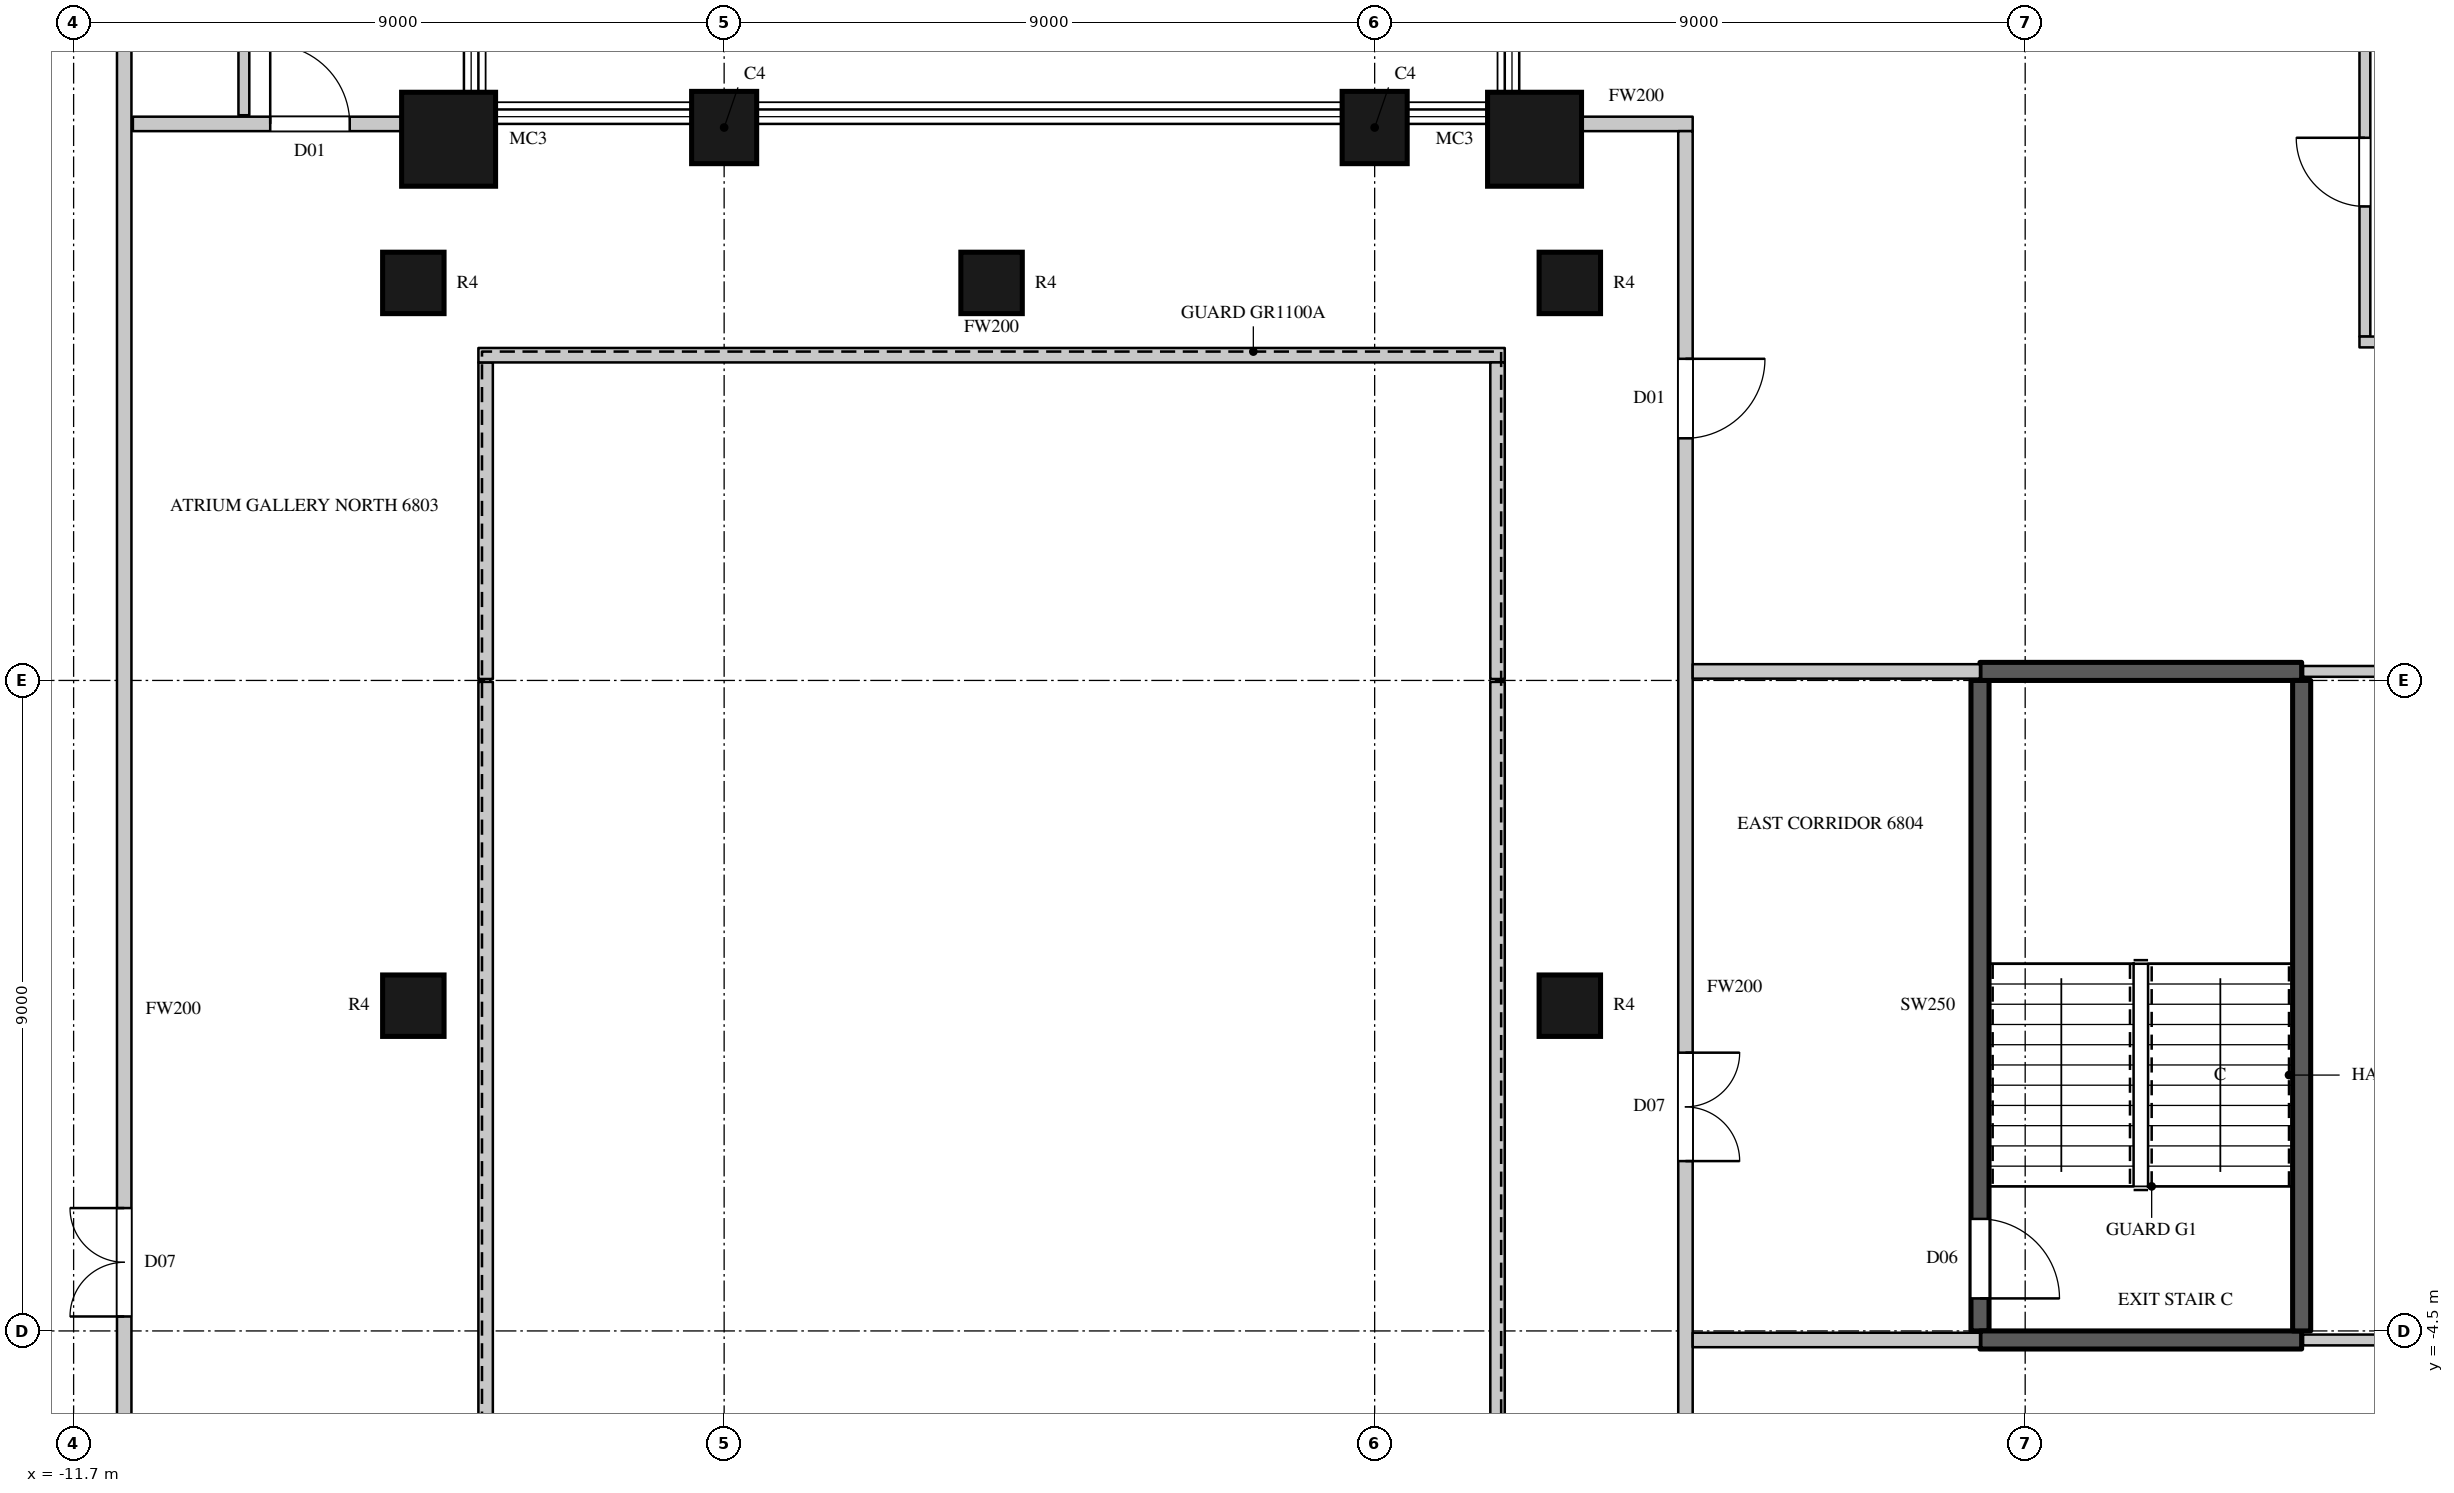
"""IFC4 building model, lengths in metres.
Left out: names, types, materials, properties, quantities, classifications, styles, units other than length and angle.
Written with IfcOpenShell. Run it as: python <this file> out.ifc"""

import sys

from ifc_helpers import new_model, si_unit, direction, frame, frame_2d, origin, origin_2d, place, context, subcontext, project, spatial, rectangle, circle, extrude, element, fill, save


model = new_model("IFC4")
c1 = context("Model", 3, precision=1e-05, world=origin(), true_north=direction((0.0, 1.0)))
c2 = subcontext(c1, "Body", "Model", "MODEL_VIEW")
j1 = project(units=[si_unit("LENGTHUNIT", "METRE"), si_unit("PLANEANGLEUNIT", "RADIAN")], contexts=[c1])
p1 = place(None, origin())
s1 = spatial("IfcSite", under=j1, at=p1, CompositionType="ELEMENT")
p2 = place(p1, origin())
s2 = spatial("IfcBuilding", under=s1, at=p2, CompositionType="ELEMENT")
p3 = place(p2, frame((0.0, 0.0, 300.8)))
s3 = spatial("IfcBuildingStorey", under=s2, at=p3, CompositionType="ELEMENT", Elevation=300.8)
p4 = place(p3, frame((8.512, 11.988, 0.0), z_axis=(0.0, 0.0, 1.0), x_axis=(1.0, 0.0, 0.0)))
e1 = element("IfcColumn", 1, at=p4, inside=s3, PredefinedType="COLUMN", context=c2, shape_type="SweptSolid", body=[
    extrude(circle(Radius=0.65, at=origin_2d()), origin(), (0.0, 0.0, 1.0), 4.1),
])
for number, where, z_axis, x_axis in (
    (2, (6.3, 12.15, 0.0), (0.0, 0.0, 1.0), (-1.0, 0.0, 0.0)),
    (3, (-2.7, 12.15, 0.0), (0.0, 0.0, 1.0), (-1.0, 0.0, 0.0)),
):
    element("IfcColumn", number, at=place(p3, frame(where, z_axis=z_axis, x_axis=x_axis)), inside=s3, PredefinedType="COLUMN", context=c2, shape_type="SweptSolid", body=[
        extrude(rectangle(XDim=0.9, YDim=1.0, at=origin_2d()), origin(), (0.0, 0.0, 1.0), 4.1),
    ])
p5 = place(p3, frame((-6.512, 11.988, 0.0), z_axis=(0.0, 0.0, 1.0), x_axis=(1.0, 0.0, 0.0)))
e4 = element("IfcColumn", 4, at=p5, inside=s3, PredefinedType="COLUMN", context=c2, shape_type="SweptSolid", body=[
    extrude(circle(Radius=0.65, at=origin_2d()), origin(), (0.0, 0.0, 1.0), 4.1),
])
for number, where, z_axis, x_axis in (
    (5, (-7.0, 0.0, 0.0), (0.0, 0.0, 1.0), (1.0, 0.0, 0.0)),
    (6, (-7.0, 10.0, 0.0), (0.0, 0.0, 1.0), (1.0, 0.0, 0.0)),
    (7, (1.0, 10.0, 0.0), (0.0, 0.0, 1.0), (1.0, 0.0, 0.0)),
    (8, (9.0, 0.0, 0.0), (0.0, 0.0, 1.0), (1.0, 0.0, 0.0)),
    (9, (9.0, 10.0, 0.0), (0.0, 0.0, 1.0), (1.0, 0.0, 0.0)),
):
    element("IfcColumn", number, at=place(p3, frame(where, z_axis=z_axis, x_axis=x_axis)), inside=s3, PredefinedType="COLUMN", context=c2, shape_type="SweptSolid", body=[
        extrude(circle(Radius=0.425, at=origin_2d()), origin(), (0.0, 0.0, 1.0), 4.1),
    ])
p6 = place(p3, frame((-11.0, -14.8, 0.0), z_axis=(0.0, 0.0, 1.0), x_axis=(0.0, 1.0, 0.0)))
e10 = element("IfcWall", 10, at=p6, inside=s3, PredefinedType="PARTITIONING", context=c2, shape_type="SweptSolid", body=[
    extrude(rectangle(XDim=29.5, YDim=0.2, at=frame_2d((14.75, 0.0))), origin(), (0.0, 0.0, 1.0), 3.8),
])
p7 = place(p6, frame((10.5, 0.0, 0.0)))
e11 = element("IfcOpeningElement", 11, at=p7, cuts=e10, PredefinedType="OPENING", context=c2, shape_type="SweptSolid", body=[
    extrude(rectangle(XDim=1.5, YDim=2.4, at=frame_2d((0.75, 1.2))), frame((0.0, 0.11, 0.0), z_axis=(0.0, -1.0, 0.0), x_axis=(1.0, 0.0, 0.0)), (0.0, 0.0, 1.0), 0.22),
])
p8 = place(p3, frame((-10.88, 12.2, 0.0), z_axis=(0.0, 0.0, 1.0), x_axis=(1.0, 0.0, 0.0)))
e12 = element("IfcWall", 12, at=p8, inside=s3, PredefinedType="PARTITIONING", context=c2, shape_type="SweptSolid", body=[
    extrude(rectangle(XDim=3.736, YDim=0.2, at=frame_2d((1.868, 0.0))), origin(), (0.0, 0.0, 1.0), 3.8),
])
p9 = place(p8, frame((1.9, 0.0, 0.0)))
e13 = element("IfcOpeningElement", 13, at=p9, cuts=e12, PredefinedType="OPENING", context=c2, shape_type="SweptSolid", body=[
    extrude(rectangle(XDim=1.1, YDim=2.4, at=frame_2d((0.55, 1.2))), frame((0.0, 0.11, 0.0), z_axis=(0.0, -1.0, 0.0), x_axis=(1.0, 0.0, 0.0)), (0.0, 0.0, 1.0), 0.22),
])
p10 = place(p3, frame((-6.0, -8.9, 0.0), z_axis=(0.0, 0.0, 1.0), x_axis=(0.0, 1.0, 0.0)))
e14 = element("IfcWall", 14, at=p10, inside=s3, PredefinedType="PARTITIONING", context=c2, shape_type="SweptSolid", body=[
    extrude(rectangle(XDim=13.38, YDim=0.2, at=frame_2d((6.69, 0.0))), origin(), (0.0, 0.0, 1.0), 3.8),
])
p11 = place(p3, frame((-6.0, 4.52, 0.0), z_axis=(0.0, 0.0, 1.0), x_axis=(0.0, 1.0, 0.0)))
e15 = element("IfcWall", 15, at=p11, inside=s3, PredefinedType="PARTITIONING", context=c2, shape_type="SweptSolid", body=[
    extrude(rectangle(XDim=4.38, YDim=0.2, at=frame_2d((2.19, 0.0))), origin(), (0.0, 0.0, 1.0), 3.8),
])
p12 = place(p3, frame((-6.1, 9.0, 0.0), z_axis=(0.0, 0.0, 1.0), x_axis=(1.0, 0.0, 0.0)))
e16 = element("IfcWall", 16, at=p12, inside=s3, PredefinedType="PARTITIONING", context=c2, shape_type="SweptSolid", body=[
    extrude(rectangle(XDim=14.2, YDim=0.2, at=frame_2d((7.1, 0.0))), origin(), (0.0, 0.0, 1.0), 3.8),
])
p13 = place(p3, frame((8.0, -8.9, 0.0), z_axis=(0.0, 0.0, 1.0), x_axis=(0.0, 1.0, 0.0)))
e17 = element("IfcWall", 17, at=p13, inside=s3, PredefinedType="PARTITIONING", context=c2, shape_type="SweptSolid", body=[
    extrude(rectangle(XDim=13.38, YDim=0.2, at=frame_2d((6.69, 0.0))), origin(), (0.0, 0.0, 1.0), 3.8),
])
p14 = place(p3, frame((8.0, 4.52, 0.0), z_axis=(0.0, 0.0, 1.0), x_axis=(0.0, 1.0, 0.0)))
e18 = element("IfcWall", 18, at=p14, inside=s3, PredefinedType="PARTITIONING", context=c2, shape_type="SweptSolid", body=[
    extrude(rectangle(XDim=4.38, YDim=0.2, at=frame_2d((2.19, 0.0))), origin(), (0.0, 0.0, 1.0), 3.8),
])
p15 = place(p3, frame((9.144, 12.2, 0.0), z_axis=(0.0, 0.0, 1.0), x_axis=(1.0, 0.0, 0.0)))
e19 = element("IfcWall", 19, at=p15, inside=s3, PredefinedType="PARTITIONING", context=c2, shape_type="SweptSolid", body=[
    extrude(rectangle(XDim=1.556, YDim=0.2, at=frame_2d((0.778, 0.0))), origin(), (0.0, 0.0, 1.0), 3.8),
])
p16 = place(p3, frame((10.6, -11.6, 0.0), z_axis=(0.0, 0.0, 1.0), x_axis=(0.0, 1.0, 0.0)))
e20 = element("IfcWall", 20, at=p16, inside=s3, PredefinedType="PARTITIONING", context=c2, shape_type="SweptSolid", body=[
    extrude(rectangle(XDim=23.7, YDim=0.2, at=frame_2d((11.85, 0.0))), origin(), (0.0, 0.0, 1.0), 3.8),
])
p17 = place(p16, frame((9.45, 0.0, 0.0)))
e21 = element("IfcOpeningElement", 21, at=p17, cuts=e20, PredefinedType="OPENING", context=c2, shape_type="SweptSolid", body=[
    extrude(rectangle(XDim=1.5, YDim=2.4, at=frame_2d((0.75, 1.2))), frame((0.0, 0.11, 0.0), z_axis=(0.0, -1.0, 0.0), x_axis=(1.0, 0.0, 0.0)), (0.0, 0.0, 1.0), 0.22),
])
p18 = place(p16, frame((19.45, 0.0, 0.0)))
e22 = element("IfcOpeningElement", 22, at=p18, cuts=e20, PredefinedType="OPENING", context=c2, shape_type="SweptSolid", body=[
    extrude(rectangle(XDim=1.1, YDim=2.4, at=frame_2d((0.55, 1.2))), frame((0.0, 0.11, 0.0), z_axis=(0.0, -1.0, 0.0), x_axis=(1.0, 0.0, 0.0)), (0.0, 0.0, 1.0), 0.22),
])
p19 = place(p16, frame((4.6, 0.0, 0.0)))
e23 = element("IfcOpeningElement", 23, at=p19, cuts=e20, PredefinedType="OPENING", context=c2, shape_type="SweptSolid", body=[
    extrude(rectangle(XDim=1.1, YDim=2.4, at=frame_2d((0.55, 1.2))), frame((0.0, 0.11, 0.0), z_axis=(0.0, -1.0, 0.0), x_axis=(1.0, 0.0, 0.0)), (0.0, 0.0, 1.0), 0.22),
])
for number, where, z_axis, x_axis in (
    (24, (10.7, -4.625, 0.0), (0.0, 0.0, 1.0), (1.0, 0.0, 0.0)),
    (25, (10.7, 4.625, 0.0), (0.0, 0.0, 1.0), (1.0, 0.0, 0.0)),
):
    element("IfcWall", number, at=place(p3, frame(where, z_axis=z_axis, x_axis=x_axis)), inside=s3, PredefinedType="PARTITIONING", context=c2, shape_type="SweptSolid", body=[
        extrude(rectangle(XDim=3.975, YDim=0.2, at=frame_2d((1.988, 0.0))), origin(), (0.0, 0.0, 1.0), 3.8),
    ])
p20 = place(p3, frame((-9.344, 12.32, 0.0), z_axis=(0.0, 0.0, 1.0), x_axis=(0.0, 1.0, 0.0)))
e26 = element("IfcWall", 26, at=p20, inside=s3, PredefinedType="PARTITIONING", context=c2, shape_type="SweptSolid", body=[
    extrude(rectangle(XDim=12.675, YDim=0.15, at=frame_2d((6.338, 0.0))), origin(), (0.0, 0.0, 1.0), 3.8),
])
for number, where, z_axis, x_axis in (
    (27, (19.145, -4.625, 0.0), (0.0, 0.0, 1.0), (1.0, 0.0, 0.0)),
    (28, (19.145, 4.625, 0.0), (0.0, 0.0, 1.0), (1.0, 0.0, 0.0)),
):
    element("IfcWall", number, at=place(p3, frame(where, z_axis=z_axis, x_axis=x_axis)), inside=s3, PredefinedType="PARTITIONING", context=c2, shape_type="SweptSolid", body=[
        extrude(rectangle(XDim=4.605, YDim=0.15, at=frame_2d((2.302, 0.0))), origin(), (0.0, 0.0, 1.0), 3.8),
    ])
p21 = place(p3, frame((20.0, 9.258, 0.0), z_axis=(0.0, 0.0, 1.0), x_axis=(0.0, 1.0, 0.0)))
e29 = element("IfcWall", 29, at=p21, inside=s3, PredefinedType="PARTITIONING", context=c2, shape_type="SweptSolid", body=[
    extrude(rectangle(XDim=4.532, YDim=0.15, at=frame_2d((2.266, 0.0))), origin(), (0.0, 0.0, 1.0), 3.8),
])
p22 = place(p21, frame((1.8, 0.0, 0.0)))
e30 = element("IfcOpeningElement", 30, at=p22, cuts=e29, PredefinedType="OPENING", context=c2, shape_type="SweptSolid", body=[
    extrude(rectangle(XDim=0.95, YDim=2.2, at=frame_2d((0.475, 1.1))), frame((0.0, 0.085, 0.0), z_axis=(0.0, -1.0, 0.0), x_axis=(1.0, 0.0, 0.0)), (0.0, 0.0, 1.0), 0.17),
])
p23 = place(p3, frame((19.925, 9.183, 0.0), z_axis=(0.0, 0.0, 1.0), x_axis=(1.0, 0.0, 0.0)))
e31 = element("IfcWall", 31, at=p23, inside=s3, PredefinedType="PARTITIONING", context=c2, shape_type="SweptSolid", body=[
    extrude(rectangle(XDim=4.375, YDim=0.15, at=frame_2d((2.188, 0.0))), origin(), (0.0, 0.0, 1.0), 3.15),
])
p24 = place(p3, frame((14.675, -4.5, 0.0), z_axis=(0.0, 0.0, 1.0), x_axis=(0.0, 1.0, 0.0)))
e32 = element("IfcWall", 32, at=p24, inside=s3, PredefinedType="SHEAR", context=c2, shape_type="SweptSolid", body=[
    extrude(rectangle(XDim=9.0, YDim=0.25, at=frame_2d((4.5, 0.0))), origin(), (0.0, 0.0, 1.0), 3.8),
])
p25 = place(p24, frame((0.45, 0.0, 0.0)))
e33 = element("IfcOpeningElement", 33, at=p25, cuts=e32, PredefinedType="OPENING", context=c2, shape_type="SweptSolid", body=[
    extrude(rectangle(XDim=1.1, YDim=2.2, at=frame_2d((0.55, 1.1))), frame((0.0, 0.135, 0.0), z_axis=(0.0, -1.0, 0.0), x_axis=(1.0, 0.0, 0.0)), (0.0, 0.0, 1.0), 0.27),
])
for number, where, z_axis, x_axis in (
    (34, (14.675, -4.625, 0.0), (0.0, 0.0, 1.0), (1.0, 0.0, 0.0)),
    (35, (14.675, 4.625, 0.0), (0.0, 0.0, 1.0), (1.0, 0.0, 0.0)),
):
    element("IfcWall", number, at=place(p3, frame(where, z_axis=z_axis, x_axis=x_axis)), inside=s3, PredefinedType="SHEAR", context=c2, shape_type="SweptSolid", body=[
        extrude(rectangle(XDim=4.45, YDim=0.25, at=frame_2d((2.225, 0.0))), origin(), (0.0, 0.0, 1.0), 3.8),
    ])
p26 = place(p3, frame((19.125, -4.5, 0.0), z_axis=(0.0, 0.0, 1.0), x_axis=(0.0, 1.0, 0.0)))
e36 = element("IfcWall", 36, at=p26, inside=s3, PredefinedType="SHEAR", context=c2, shape_type="SweptSolid", body=[
    extrude(rectangle(XDim=9.0, YDim=0.25, at=frame_2d((4.5, 0.0))), origin(), (0.0, 0.0, 1.0), 3.8),
])
p27 = place(p7, origin())
e37 = element("IfcDoor", 37, at=p27, inside=s3, OperationType="DOUBLE_DOOR_SINGLE_SWING", PredefinedType="DOOR", context=c2, shape_type="SweptSolid", body=[
    extrude(rectangle(XDim=1.5, YDim=2.4, at=frame_2d((0.75, 1.2))), frame((0.0, 0.025, 0.0), z_axis=(0.0, -1.0, 0.0), x_axis=(1.0, 0.0, 0.0)), (0.0, 0.0, 1.0), 0.05),
])
fill(e11, e37)
p28 = place(p17, origin())
e38 = element("IfcDoor", 38, at=p28, inside=s3, OperationType="DOUBLE_DOOR_SINGLE_SWING", PredefinedType="DOOR", context=c2, shape_type="SweptSolid", body=[
    extrude(rectangle(XDim=1.5, YDim=2.4, at=frame_2d((0.75, 1.2))), frame((0.0, 0.025, 0.0), z_axis=(0.0, -1.0, 0.0), x_axis=(1.0, 0.0, 0.0)), (0.0, 0.0, 1.0), 0.05),
])
fill(e21, e38)
p29 = place(p9, origin())
e39 = element("IfcDoor", 39, at=p29, inside=s3, OperationType="SINGLE_SWING_LEFT", PredefinedType="DOOR", context=c2, shape_type="SweptSolid", body=[
    extrude(rectangle(XDim=1.1, YDim=2.4, at=frame_2d((0.55, 1.2))), frame((0.0, 0.025, 0.0), z_axis=(0.0, -1.0, 0.0), x_axis=(1.0, 0.0, 0.0)), (0.0, 0.0, 1.0), 0.05),
])
fill(e13, e39)
p30 = place(p18, origin())
e40 = element("IfcDoor", 40, at=p30, inside=s3, OperationType="SINGLE_SWING_LEFT", PredefinedType="DOOR", context=c2, shape_type="SweptSolid", body=[
    extrude(rectangle(XDim=1.1, YDim=2.4, at=frame_2d((0.55, 1.2))), frame((0.0, 0.025, 0.0), z_axis=(0.0, -1.0, 0.0), x_axis=(1.0, 0.0, 0.0)), (0.0, 0.0, 1.0), 0.05),
])
fill(e22, e40)
p31 = place(p22, origin())
e41 = element("IfcDoor", 41, at=p31, inside=s3, OperationType="SINGLE_SWING_RIGHT", PredefinedType="DOOR", context=c2, shape_type="SweptSolid", body=[
    extrude(rectangle(XDim=0.95, YDim=2.2, at=frame_2d((0.475, 1.1))), frame((0.0, 0.025, 0.0), z_axis=(0.0, -1.0, 0.0), x_axis=(1.0, 0.0, 0.0)), (0.0, 0.0, 1.0), 0.05),
])
fill(e30, e41)
p32 = place(p25, origin())
e42 = element("IfcDoor", 42, at=p32, inside=s3, OperationType="SINGLE_SWING_RIGHT", PredefinedType="DOOR", context=c2, shape_type="SweptSolid", body=[
    extrude(rectangle(XDim=1.1, YDim=2.2, at=frame_2d((0.55, 1.1))), frame((0.0, 0.025, 0.0), z_axis=(0.0, -1.0, 0.0), x_axis=(1.0, 0.0, 0.0)), (0.0, 0.0, 1.0), 0.05),
])
fill(e33, e42)
save(model, sys.argv[1])
